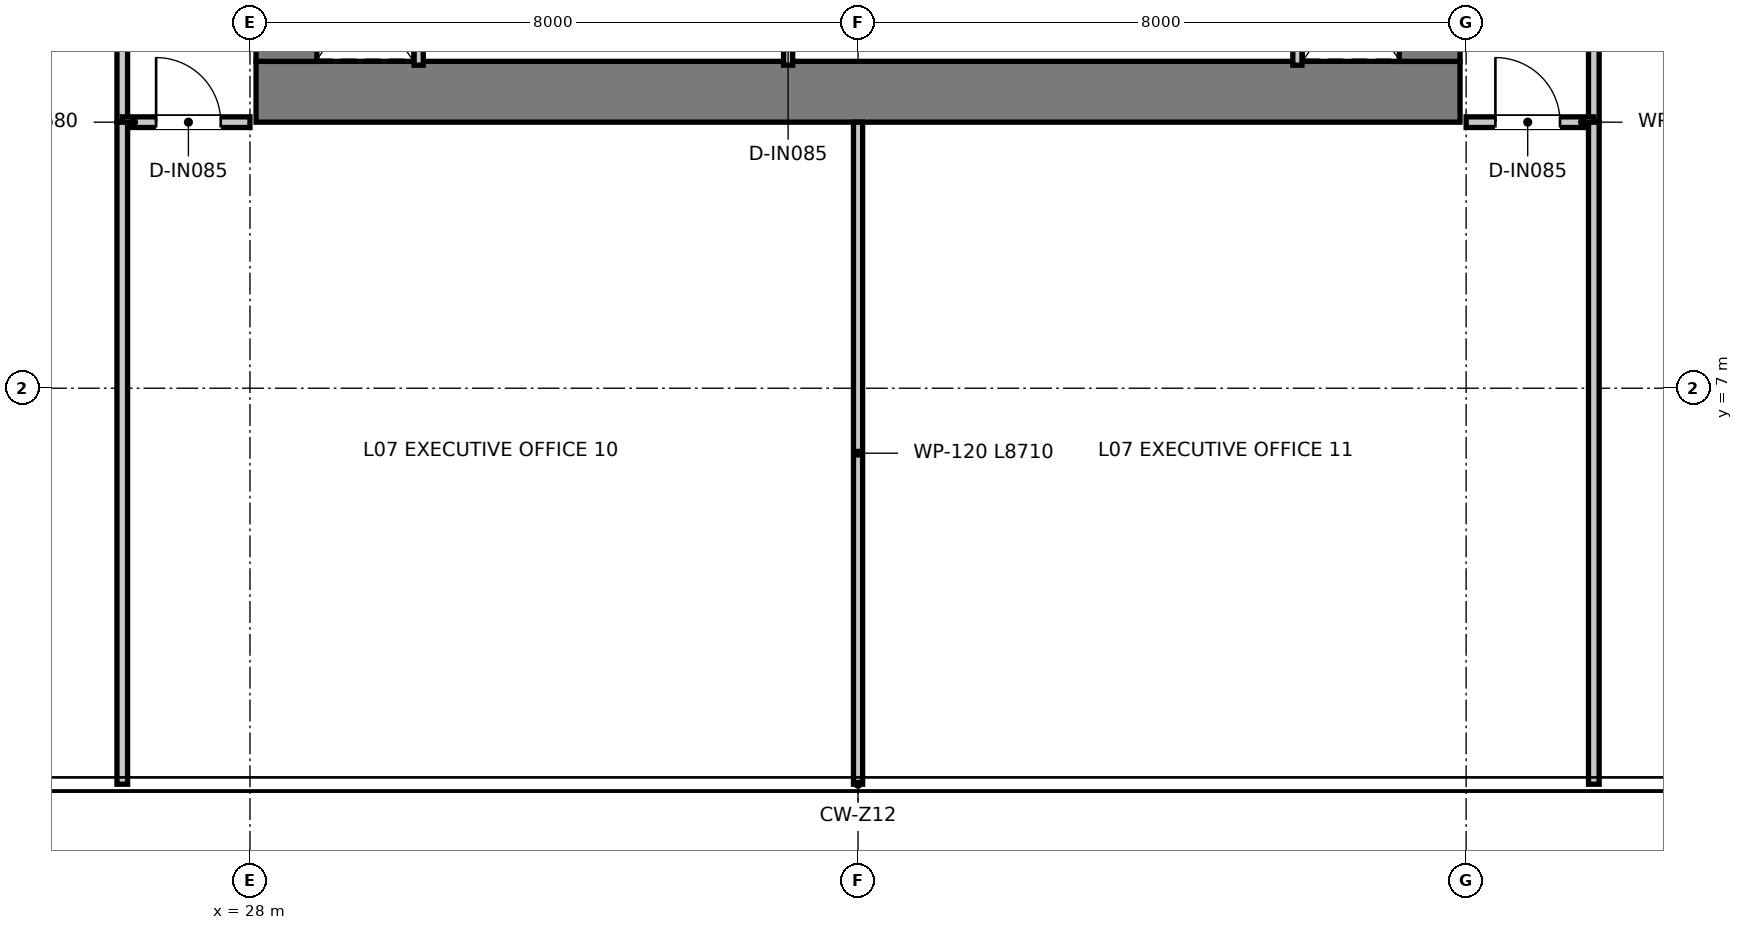
"""IFC4 building model, lengths in metres.
Left out: names, types, materials, properties, quantities, classifications, styles, units other than length and angle.
Written with IfcOpenShell. Run it as: python <this file> out.ifc"""

import sys

from ifc_helpers import new_model, si_unit, direction, frame, frame_2d, origin, place, context, subcontext, project, spatial, rectangle, extrude, element, fill, save


model = new_model("IFC4")
c1 = context("Model", 3, precision=1e-05, world=origin(), true_north=direction((0.0, 1.0)))
c2 = subcontext(c1, "Body", "Model", "MODEL_VIEW")
j1 = project(units=[si_unit("LENGTHUNIT", "METRE"), si_unit("PLANEANGLEUNIT", "RADIAN")], contexts=[c1])
p1 = place(None, origin())
s1 = spatial("IfcSite", under=j1, at=p1, CompositionType="ELEMENT")
p2 = place(p1, origin())
s2 = spatial("IfcBuilding", under=s1, at=p2, CompositionType="ELEMENT")
p3 = place(p2, frame((0.0, 0.0, 32.9)))
s3 = spatial("IfcBuildingStorey", under=s2, at=p3, CompositionType="ELEMENT", Elevation=32.9)
p4 = place(p3, frame((28.08, 10.9, 0.0), z_axis=(0.0, 0.0, 1.0), x_axis=(1.0, 0.0, 0.0)))
e1 = element("IfcWall", 1, at=p4, inside=s3, PredefinedType="SHEAR", context=c2, shape_type="SweptSolid", body=[
    extrude(rectangle(XDim=15.84, YDim=0.8, at=frame_2d((7.92, 0.0))), origin(), (0.0, 0.0, 1.0), 3.95),
])
for number, where, z_axis, x_axis in (
    (2, (28.48, 11.3, 0.0), (0.0, 0.0, 1.0), (0.0, 1.0, 0.0)),
    (3, (43.52, 11.3, 0.0), (0.0, 0.0, 1.0), (0.0, 1.0, 0.0)),
):
    element("IfcWall", number, at=place(p3, frame(where, z_axis=z_axis, x_axis=x_axis)), inside=s3, PredefinedType="SHEAR", context=c2, shape_type="SweptSolid", body=[
        extrude(rectangle(XDim=14.7, YDim=0.8, at=frame_2d((7.35, 0.0))), origin(), (0.0, 0.0, 1.0), 3.95),
    ])
for number, where, z_axis, x_axis in (
    (4, (30.22, 11.25, 0.0), (0.0, 0.0, 1.0), (0.0, 1.0, 0.0)),
    (5, (41.78, 11.25, 0.0), (0.0, 0.0, 1.0), (0.0, 1.0, 0.0)),
):
    element("IfcWall", number, at=place(p3, frame(where, z_axis=z_axis, x_axis=x_axis)), inside=s3, PredefinedType="PARTITIONING", context=c2, shape_type="SweptSolid", body=[
        extrude(rectangle(XDim=1.97, YDim=0.12, at=frame_2d((0.985, 0.0))), origin(), (0.0, 0.0, 1.0), 3.67),
    ])
p5 = place(p3, frame((35.08, 11.25, 0.0), z_axis=(0.0, 0.0, 1.0), x_axis=(0.0, 1.0, 0.0)))
e6 = element("IfcWall", 6, at=p5, inside=s3, PredefinedType="PARTITIONING", context=c2, shape_type="SweptSolid", body=[
    extrude(rectangle(XDim=1.97, YDim=0.12, at=frame_2d((0.985, 0.0))), origin(), (0.0, 0.0, 1.0), 3.67),
])
p6 = place(p5, frame((0.545, 0.0, 0.0)))
e7 = element("IfcOpeningElement", 7, at=p6, cuts=e6, PredefinedType="OPENING", context=c2, shape_type="SweptSolid", body=[
    extrude(rectangle(XDim=0.85, YDim=2.1, at=frame_2d((0.425, 1.05))), frame((0.0, 0.07, 0.0), z_axis=(0.0, -1.0, 0.0), x_axis=(1.0, 0.0, 0.0)), (0.0, 0.0, 1.0), 0.14),
])
p7 = place(p3, frame((26.32, 10.5, 0.0), z_axis=(0.0, 0.0, 1.0), x_axis=(0.0, 1.0, 0.0)))
e8 = element("IfcWall", 8, at=p7, inside=s3, PredefinedType="PARTITIONING", context=c2, shape_type="SweptSolid", body=[
    extrude(rectangle(XDim=25.62, YDim=0.14, at=frame_2d((12.81, 0.0))), origin(), (0.0, 0.0, 1.0), 2.97),
])
p8 = place(p7, frame((7.775, 0.0, 0.0)))
e9 = element("IfcOpeningElement", 9, at=p8, cuts=e8, PredefinedType="OPENING", context=c2, shape_type="SweptSolid", body=[
    extrude(rectangle(XDim=0.95, YDim=2.1, at=frame_2d((0.475, 1.05))), frame((0.0, 0.08, 0.0), z_axis=(0.0, -1.0, 0.0), x_axis=(1.0, 0.0, 0.0)), (0.0, 0.0, 1.0), 0.16),
])
p9 = place(p7, frame((12.425, 0.0, 0.0)))
e10 = element("IfcOpeningElement", 10, at=p9, cuts=e8, PredefinedType="OPENING", context=c2, shape_type="SweptSolid", body=[
    extrude(rectangle(XDim=0.95, YDim=2.1, at=frame_2d((0.475, 1.05))), frame((0.0, 0.08, 0.0), z_axis=(0.0, -1.0, 0.0), x_axis=(1.0, 0.0, 0.0)), (0.0, 0.0, 1.0), 0.16),
])
p10 = place(p7, frame((18.825, 0.0, 0.0)))
e11 = element("IfcOpeningElement", 11, at=p10, cuts=e8, PredefinedType="OPENING", context=c2, shape_type="SweptSolid", body=[
    extrude(rectangle(XDim=0.95, YDim=2.1, at=frame_2d((0.475, 1.05))), frame((0.0, 0.08, 0.0), z_axis=(0.0, -1.0, 0.0), x_axis=(1.0, 0.0, 0.0)), (0.0, 0.0, 1.0), 0.16),
])
p11 = place(p7, frame((22.775, 0.0, 0.0)))
e12 = element("IfcOpeningElement", 12, at=p11, cuts=e8, PredefinedType="OPENING", context=c2, shape_type="SweptSolid", body=[
    extrude(rectangle(XDim=0.95, YDim=2.1, at=frame_2d((0.475, 1.05))), frame((0.0, 0.08, 0.0), z_axis=(0.0, -1.0, 0.0), x_axis=(1.0, 0.0, 0.0)), (0.0, 0.0, 1.0), 0.16),
])
p12 = place(p3, frame((45.68, 10.5, 0.0), z_axis=(0.0, 0.0, 1.0), x_axis=(0.0, 1.0, 0.0)))
e13 = element("IfcWall", 13, at=p12, inside=s3, PredefinedType="PARTITIONING", context=c2, shape_type="SweptSolid", body=[
    extrude(rectangle(XDim=25.62, YDim=0.14, at=frame_2d((12.81, 0.0))), origin(), (0.0, 0.0, 1.0), 2.97),
])
p13 = place(p12, frame((9.775, 0.0, 0.0)))
e14 = element("IfcOpeningElement", 14, at=p13, cuts=e13, PredefinedType="OPENING", context=c2, shape_type="SweptSolid", body=[
    extrude(rectangle(XDim=0.95, YDim=2.1, at=frame_2d((0.475, 1.05))), frame((0.0, 0.08, 0.0), z_axis=(0.0, -1.0, 0.0), x_axis=(1.0, 0.0, 0.0)), (0.0, 0.0, 1.0), 0.16),
])
p14 = place(p12, frame((18.375, 0.0, 0.0)))
e15 = element("IfcOpeningElement", 15, at=p14, cuts=e13, PredefinedType="OPENING", context=c2, shape_type="SweptSolid", body=[
    extrude(rectangle(XDim=0.95, YDim=2.1, at=frame_2d((0.475, 1.05))), frame((0.0, 0.08, 0.0), z_axis=(0.0, -1.0, 0.0), x_axis=(1.0, 0.0, 0.0)), (0.0, 0.0, 1.0), 0.16),
])
p15 = place(p3, frame((26.32, 10.5, 0.0), z_axis=(0.0, 0.0, 1.0), x_axis=(1.0, 0.0, 0.0)))
e16 = element("IfcWall", 16, at=p15, inside=s3, PredefinedType="PARTITIONING", context=c2, shape_type="SweptSolid", body=[
    extrude(rectangle(XDim=1.68, YDim=0.14, at=frame_2d((0.84, 0.0))), origin(), (0.0, 0.0, 1.0), 3.67),
])
p16 = place(p15, frame((0.445, 0.0, 0.0)))
e17 = element("IfcOpeningElement", 17, at=p16, cuts=e16, PredefinedType="OPENING", context=c2, shape_type="SweptSolid", body=[
    extrude(rectangle(XDim=0.85, YDim=2.1, at=frame_2d((0.425, 1.05))), frame((0.0, 0.08, 0.0), z_axis=(0.0, -1.0, 0.0), x_axis=(1.0, 0.0, 0.0)), (0.0, 0.0, 1.0), 0.16),
])
p17 = place(p3, frame((44.0, 10.5, 0.0), z_axis=(0.0, 0.0, 1.0), x_axis=(1.0, 0.0, 0.0)))
e18 = element("IfcWall", 18, at=p17, inside=s3, PredefinedType="PARTITIONING", context=c2, shape_type="SweptSolid", body=[
    extrude(rectangle(XDim=1.68, YDim=0.14, at=frame_2d((0.84, 0.0))), origin(), (0.0, 0.0, 1.0), 3.67),
])
p18 = place(p17, frame((0.385, 0.0, 0.0)))
e19 = element("IfcOpeningElement", 19, at=p18, cuts=e18, PredefinedType="OPENING", context=c2, shape_type="SweptSolid", body=[
    extrude(rectangle(XDim=0.85, YDim=2.1, at=frame_2d((0.425, 1.05))), frame((0.0, 0.08, 0.0), z_axis=(0.0, -1.0, 0.0), x_axis=(1.0, 0.0, 0.0)), (0.0, 0.0, 1.0), 0.16),
])
for number, where, z_axis, x_axis in (
    (20, (26.32, 1.79, 0.0), (0.0, 0.0, 1.0), (0.0, 1.0, 0.0)),
    (21, (45.68, 1.79, 0.0), (0.0, 0.0, 1.0), (0.0, 1.0, 0.0)),
):
    element("IfcWall", number, at=place(p3, frame(where, z_axis=z_axis, x_axis=x_axis)), inside=s3, PredefinedType="PARTITIONING", context=c2, shape_type="SweptSolid", body=[
        extrude(rectangle(XDim=8.71, YDim=0.14, at=frame_2d((4.355, 0.0))), origin(), (0.0, 0.0, 1.0), 3.67),
    ])
p19 = place(p3, frame((36.0, 1.79, 0.0), z_axis=(0.0, 0.0, 1.0), x_axis=(0.0, 1.0, 0.0)))
e22 = element("IfcWall", 22, at=p19, inside=s3, PredefinedType="PARTITIONING", context=c2, shape_type="SweptSolid", body=[
    extrude(rectangle(XDim=8.71, YDim=0.12, at=frame_2d((4.355, 0.0))), origin(), (0.0, 0.0, 1.0), 3.67),
])
p20 = place(p16, origin())
e23 = element("IfcDoor", 23, at=p20, inside=s3, OperationType="SINGLE_SWING_LEFT", PredefinedType="DOOR", context=c2, shape_type="SweptSolid", body=[
    extrude(rectangle(XDim=0.85, YDim=2.1, at=frame_2d((0.425, 1.05))), frame((0.0, 0.025, 0.0), z_axis=(0.0, -1.0, 0.0), x_axis=(1.0, 0.0, 0.0)), (0.0, 0.0, 1.0), 0.05),
])
fill(e17, e23)
p21 = place(p18, origin())
e24 = element("IfcDoor", 24, at=p21, inside=s3, OperationType="SINGLE_SWING_LEFT", PredefinedType="DOOR", context=c2, shape_type="SweptSolid", body=[
    extrude(rectangle(XDim=0.85, YDim=2.1, at=frame_2d((0.425, 1.05))), frame((0.0, 0.025, 0.0), z_axis=(0.0, -1.0, 0.0), x_axis=(1.0, 0.0, 0.0)), (0.0, 0.0, 1.0), 0.05),
])
fill(e19, e24)
save(model, sys.argv[1])
